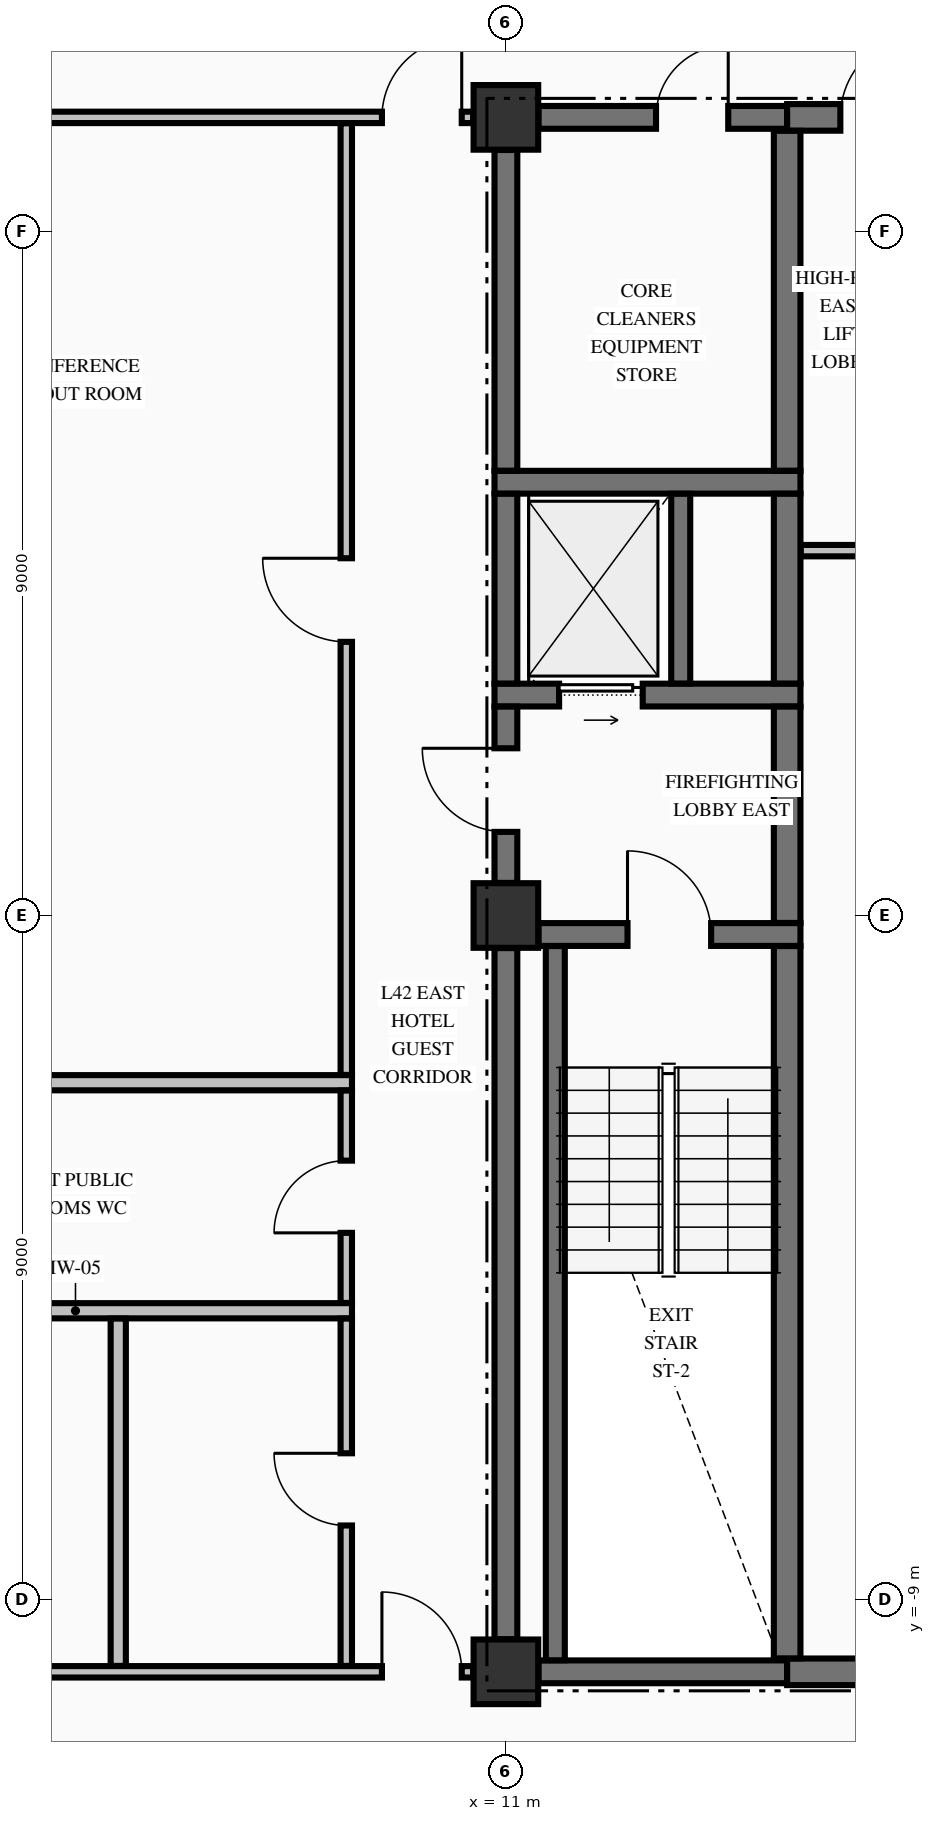
"""IFC4 building model, lengths in metres.
Left out: names, types, materials, properties, quantities, classifications, styles, units other than length and angle.
Written with IfcOpenShell. Run it as: python <this file> out.ifc"""

import sys

from ifc_helpers import new_model, si_unit, direction, frame, frame_2d, origin, origin_2d, place, context, subcontext, project, spatial, rectangle, extrude, element, fill, save


model = new_model("IFC4")
c1 = context("Model", 3, precision=1e-05, world=origin(), true_north=direction((0.0, 1.0)))
c2 = subcontext(c1, "Body", "Model", "MODEL_VIEW")
j1 = project(units=[si_unit("LENGTHUNIT", "METRE"), si_unit("PLANEANGLEUNIT", "RADIAN")], contexts=[c1])
p1 = place(None, origin())
s1 = spatial("IfcSite", under=j1, at=p1, CompositionType="ELEMENT")
p2 = place(p1, origin())
s2 = spatial("IfcBuilding", under=s1, at=p2, CompositionType="ELEMENT")
p3 = place(p2, frame((0.0, 0.0, 166.06)))
s3 = spatial("IfcBuildingStorey", under=s2, at=p3, CompositionType="ELEMENT", Elevation=166.06)
for number, where, z_axis, x_axis in (
    (1, (11.0, -9.95, -0.25), (0.0, 0.0, 1.0), (1.0, 0.0, 0.0)),
    (2, (11.0, 0.0, -0.25), (0.0, 0.0, 1.0), (1.0, 0.0, 0.0)),
    (3, (11.0, 10.5, -0.25), (0.0, 0.0, 1.0), (1.0, 0.0, 0.0)),
):
    element("IfcColumn", number, at=place(p3, frame(where, z_axis=z_axis, x_axis=x_axis)), inside=s3, PredefinedType="COLUMN", context=c2, shape_type="SweptSolid", body=[
        extrude(rectangle(XDim=0.85, YDim=0.85, at=origin_2d()), origin(), (0.0, 0.0, 1.0), 3.4),
    ])
p4 = place(p3, frame((11.429, -9.95, 0.0), z_axis=(0.0, 0.0, 1.0), x_axis=(1.0, 0.0, 0.0)))
e4 = element("IfcWall", 4, at=p4, inside=s3, PredefinedType="SHEAR", context=c2, shape_type="SweptSolid", body=[
    extrude(rectangle(XDim=3.271, YDim=0.3, at=frame_2d((1.635, 0.0))), origin(), (0.0, 0.0, 1.0), 3.15),
])
p5 = place(p3, frame((14.7, -9.95, 0.0), z_axis=(0.0, 0.0, 1.0), x_axis=(1.0, 0.0, 0.0)))
e5 = element("IfcWall", 5, at=p5, inside=s3, PredefinedType="SHEAR", context=c2, shape_type="SweptSolid", body=[
    extrude(rectangle(XDim=4.871, YDim=0.35, at=frame_2d((2.436, 0.0))), origin(), (0.0, 0.0, 1.0), 3.15),
])
p6 = place(p5, frame((2.125, 0.0, 0.0)))
e6 = element("IfcOpeningElement", 6, at=p6, cuts=e5, PredefinedType="OPENING", context=c2, shape_type="SweptSolid", body=[
    extrude(rectangle(XDim=1.05, YDim=2.15, at=frame_2d((0.525, 1.075))), frame((0.0, 0.185, 0.0), z_axis=(0.0, -1.0, 0.0), x_axis=(1.0, 0.0, 0.0)), (0.0, 0.0, 1.0), 0.37),
])
p7 = place(p3, frame((11.429, -0.25, 0.0), z_axis=(0.0, 0.0, 1.0), x_axis=(1.0, 0.0, 0.0)))
e7 = element("IfcWall", 7, at=p7, inside=s3, PredefinedType="SHEAR", context=c2, shape_type="SweptSolid", body=[
    extrude(rectangle(XDim=3.446, YDim=0.3, at=frame_2d((1.723, 0.0))), origin(), (0.0, 0.0, 1.0), 3.15),
])
p8 = place(p7, frame((1.171, 0.0, 0.0)))
e8 = element("IfcOpeningElement", 8, at=p8, cuts=e7, PredefinedType="OPENING", context=c2, shape_type="SweptSolid", body=[
    extrude(rectangle(XDim=1.1, YDim=2.15, at=frame_2d((0.55, 1.075))), frame((0.0, 0.16, 0.0), z_axis=(0.0, -1.0, 0.0), x_axis=(1.0, 0.0, 0.0)), (0.0, 0.0, 1.0), 0.32),
])
p9 = place(p3, frame((10.85, 2.9, 0.0), z_axis=(0.0, 0.0, 1.0), x_axis=(1.0, 0.0, 0.0)))
e9 = element("IfcWall", 9, at=p9, inside=s3, PredefinedType="SHEAR", context=c2, shape_type="SweptSolid", body=[
    extrude(rectangle(XDim=4.025, YDim=0.3, at=frame_2d((2.012, 0.0))), origin(), (0.0, 0.0, 1.0), 3.15),
])
p10 = place(p9, frame((0.85, 0.0, 0.0)))
e10 = element("IfcOpeningElement", 10, at=p10, cuts=e9, PredefinedType="OPENING", context=c2, shape_type="SweptSolid", body=[
    extrude(rectangle(XDim=1.1, YDim=2.2, at=frame_2d((0.55, 1.1))), frame((0.0, 0.16, 0.0), z_axis=(0.0, -1.0, 0.0), x_axis=(1.0, 0.0, 0.0)), (0.0, 0.0, 1.0), 0.32),
])
p11 = place(p3, frame((10.85, 5.7, 0.0), z_axis=(0.0, 0.0, 1.0), x_axis=(1.0, 0.0, 0.0)))
e11 = element("IfcWall", 11, at=p11, inside=s3, PredefinedType="SHEAR", context=c2, shape_type="SweptSolid", body=[
    extrude(rectangle(XDim=4.025, YDim=0.3, at=frame_2d((2.012, 0.0))), origin(), (0.0, 0.0, 1.0), 3.15),
])
p12 = place(p3, frame((11.429, 10.5, 0.0), z_axis=(0.0, 0.0, 1.0), x_axis=(1.0, 0.0, 0.0)))
e12 = element("IfcWall", 12, at=p12, inside=s3, PredefinedType="SHEAR", context=c2, shape_type="SweptSolid", body=[
    extrude(rectangle(XDim=3.271, YDim=0.3, at=frame_2d((1.635, 0.0))), origin(), (0.0, 0.0, 1.0), 3.15),
])
p13 = place(p12, frame((1.546, 0.0, 0.0)))
e13 = element("IfcOpeningElement", 13, at=p13, cuts=e12, PredefinedType="OPENING", context=c2, shape_type="SweptSolid", body=[
    extrude(rectangle(XDim=0.95, YDim=2.15, at=frame_2d((0.475, 1.075))), frame((0.0, 0.16, 0.0), z_axis=(0.0, -1.0, 0.0), x_axis=(1.0, 0.0, 0.0)), (0.0, 0.0, 1.0), 0.32),
])
p14 = place(p3, frame((14.7, 10.5, 0.0), z_axis=(0.0, 0.0, 1.0), x_axis=(1.0, 0.0, 0.0)))
e14 = element("IfcWall", 14, at=p14, inside=s3, PredefinedType="SHEAR", context=c2, shape_type="SweptSolid", body=[
    extrude(rectangle(XDim=4.871, YDim=0.35, at=frame_2d((2.436, 0.0))), origin(), (0.0, 0.0, 1.0), 3.15),
])
p15 = place(p14, frame((0.7, 0.0, 0.0)))
e15 = element("IfcOpeningElement", 15, at=p15, cuts=e14, PredefinedType="OPENING", context=c2, shape_type="SweptSolid", body=[
    extrude(rectangle(XDim=1.1, YDim=2.15, at=frame_2d((0.55, 1.075))), frame((0.0, 0.185, 0.0), z_axis=(0.0, -1.0, 0.0), x_axis=(1.0, 0.0, 0.0)), (0.0, 0.0, 1.0), 0.37),
])
p16 = place(p3, frame((-10.569, -9.95, 0.0), z_axis=(0.0, 0.0, 1.0), x_axis=(1.0, 0.0, 0.0)))
e16 = element("IfcWall", 16, at=p16, inside=s3, PredefinedType="PARTITIONING", context=c2, shape_type="SweptSolid", body=[
    extrude(rectangle(XDim=21.138, YDim=0.15, at=frame_2d((10.569, 0.0))), origin(), (0.0, 0.0, 1.0), 3.15),
])
p17 = place(p16, frame((0.15, 0.0, 0.0)))
e17 = element("IfcOpeningElement", 17, at=p17, cuts=e16, PredefinedType="OPENING", context=c2, shape_type="SweptSolid", body=[
    extrude(rectangle(XDim=1.05, YDim=2.15, at=frame_2d((0.525, 1.075))), frame((0.0, 0.085, 0.0), z_axis=(0.0, -1.0, 0.0), x_axis=(1.0, 0.0, 0.0)), (0.0, 0.0, 1.0), 0.17),
])
p18 = place(p16, frame((19.938, 0.0, 0.0)))
e18 = element("IfcOpeningElement", 18, at=p18, cuts=e16, PredefinedType="OPENING", context=c2, shape_type="SweptSolid", body=[
    extrude(rectangle(XDim=1.05, YDim=2.15, at=frame_2d((0.525, 1.075))), frame((0.0, 0.085, 0.0), z_axis=(0.0, -1.0, 0.0), x_axis=(1.0, 0.0, 0.0)), (0.0, 0.0, 1.0), 0.17),
])
p19 = place(p16, frame((13.944, 0.0, 0.0)))
e19 = element("IfcOpeningElement", 19, at=p19, cuts=e16, PredefinedType="OPENING", context=c2, shape_type="SweptSolid", body=[
    extrude(rectangle(XDim=0.95, YDim=2.15, at=frame_2d((0.475, 1.075))), frame((0.0, 0.085, 0.0), z_axis=(0.0, -1.0, 0.0), x_axis=(1.0, 0.0, 0.0)), (0.0, 0.0, 1.0), 0.17),
])
for number, where, z_axis, x_axis in (
    (20, (1.7, -5.2, 0.0), (0.0, 0.0, 1.0), (1.0, 0.0, 0.0)),
    (21, (1.7, -2.2, 0.0), (0.0, 0.0, 1.0), (1.0, 0.0, 0.0)),
):
    element("IfcWall", number, at=place(p3, frame(where, z_axis=z_axis, x_axis=x_axis)), inside=s3, PredefinedType="PARTITIONING", context=c2, shape_type="SweptSolid", body=[
        extrude(rectangle(XDim=7.275, YDim=0.2, at=frame_2d((3.638, 0.0))), origin(), (0.0, 0.0, 1.0), 3.15),
    ])
p20 = place(p3, frame((14.878, 4.8, 0.0), z_axis=(0.0, 0.0, 1.0), x_axis=(1.0, 0.0, 0.0)))
e22 = element("IfcWall", 22, at=p20, inside=s3, PredefinedType="PARTITIONING", context=c2, shape_type="SweptSolid", body=[
    extrude(rectangle(XDim=4.944, YDim=0.15, at=frame_2d((2.472, 0.0))), origin(), (0.0, 0.0, 1.0), 3.15),
])
p21 = place(p3, frame((-10.569, 10.5, 0.0), z_axis=(0.0, 0.0, 1.0), x_axis=(1.0, 0.0, 0.0)))
e23 = element("IfcWall", 23, at=p21, inside=s3, PredefinedType="PARTITIONING", context=c2, shape_type="SweptSolid", body=[
    extrude(rectangle(XDim=21.138, YDim=0.15, at=frame_2d((10.569, 0.0))), origin(), (0.0, 0.0, 1.0), 3.15),
])
p22 = place(p21, frame((0.15, 0.0, 0.0)))
e24 = element("IfcOpeningElement", 24, at=p22, cuts=e23, PredefinedType="OPENING", context=c2, shape_type="SweptSolid", body=[
    extrude(rectangle(XDim=1.05, YDim=2.15, at=frame_2d((0.525, 1.075))), frame((0.0, 0.085, 0.0), z_axis=(0.0, -1.0, 0.0), x_axis=(1.0, 0.0, 0.0)), (0.0, 0.0, 1.0), 0.17),
])
p23 = place(p21, frame((19.938, 0.0, 0.0)))
e25 = element("IfcOpeningElement", 25, at=p23, cuts=e23, PredefinedType="OPENING", context=c2, shape_type="SweptSolid", body=[
    extrude(rectangle(XDim=1.05, YDim=2.15, at=frame_2d((0.525, 1.075))), frame((0.0, 0.085, 0.0), z_axis=(0.0, -1.0, 0.0), x_axis=(1.0, 0.0, 0.0)), (0.0, 0.0, 1.0), 0.17),
])
p24 = place(p3, frame((11.0, -9.521, 0.0), z_axis=(0.0, 0.0, 1.0), x_axis=(0.0, 1.0, 0.0)))
e26 = element("IfcWall", 26, at=p24, inside=s3, PredefinedType="SHEAR", context=c2, shape_type="SweptSolid", body=[
    extrude(rectangle(XDim=9.092, YDim=0.3, at=frame_2d((4.546, 0.0))), origin(), (0.0, 0.0, 1.0), 3.15),
])
p25 = place(p3, frame((11.0, 0.429, 0.0), z_axis=(0.0, 0.0, 1.0), x_axis=(0.0, 1.0, 0.0)))
e27 = element("IfcWall", 27, at=p25, inside=s3, PredefinedType="SHEAR", context=c2, shape_type="SweptSolid", body=[
    extrude(rectangle(XDim=2.319, YDim=0.3, at=frame_2d((1.16, 0.0))), origin(), (0.0, 0.0, 1.0), 3.15),
])
p26 = place(p25, frame((0.671, 0.0, 0.0)))
e28 = element("IfcOpeningElement", 28, at=p26, cuts=e27, PredefinedType="OPENING", context=c2, shape_type="SweptSolid", body=[
    extrude(rectangle(XDim=1.1, YDim=2.15, at=frame_2d((0.55, 1.075))), frame((0.0, 0.16, 0.0), z_axis=(0.0, -1.0, 0.0), x_axis=(1.0, 0.0, 0.0)), (0.0, 0.0, 1.0), 0.32),
])
p27 = place(p3, frame((11.0, 3.052, 0.0), z_axis=(0.0, 0.0, 1.0), x_axis=(0.0, 1.0, 0.0)))
e29 = element("IfcWall", 29, at=p27, inside=s3, PredefinedType="SHEAR", context=c2, shape_type="SweptSolid", body=[
    extrude(rectangle(XDim=2.496, YDim=0.3, at=frame_2d((1.248, 0.0))), origin(), (0.0, 0.0, 1.0), 3.15),
])
p28 = place(p3, frame((11.0, 5.852, 0.0), z_axis=(0.0, 0.0, 1.0), x_axis=(0.0, 1.0, 0.0)))
e30 = element("IfcWall", 30, at=p28, inside=s3, PredefinedType="SHEAR", context=c2, shape_type="SweptSolid", body=[
    extrude(rectangle(XDim=4.219, YDim=0.3, at=frame_2d((2.109, 0.0))), origin(), (0.0, 0.0, 1.0), 3.15),
])
p29 = place(p3, frame((11.65, -9.798, 0.0), z_axis=(0.0, 0.0, 1.0), x_axis=(0.0, 1.0, 0.0)))
e31 = element("IfcWall", 31, at=p29, inside=s3, PredefinedType="SOLIDWALL", context=c2, shape_type="SweptSolid", body=[
    extrude(rectangle(XDim=9.396, YDim=0.25, at=frame_2d((4.698, 0.0))), origin(), (0.0, 0.0, 1.0), 3.15),
])
p30 = place(p3, frame((13.3, 3.052, 0.0), z_axis=(0.0, 0.0, 1.0), x_axis=(0.0, 1.0, 0.0)))
e32 = element("IfcWall", 32, at=p30, inside=s3, PredefinedType="SOLIDWALL", context=c2, shape_type="SweptSolid", body=[
    extrude(rectangle(XDim=2.496, YDim=0.25, at=frame_2d((1.248, 0.0))), origin(), (0.0, 0.0, 1.0), 3.15),
])
p31 = place(p3, frame((14.7, -9.773, 0.0), z_axis=(0.0, 0.0, 1.0), x_axis=(0.0, 1.0, 0.0)))
e33 = element("IfcWall", 33, at=p31, inside=s3, PredefinedType="SHEAR", context=c2, shape_type="SweptSolid", body=[
    extrude(rectangle(XDim=9.371, YDim=0.35, at=frame_2d((4.686, 0.0))), origin(), (0.0, 0.0, 1.0), 3.15),
])
p32 = place(p3, frame((14.7, -0.098, 0.0), z_axis=(0.0, 0.0, 1.0), x_axis=(0.0, 1.0, 0.0)))
e34 = element("IfcWall", 34, at=p32, inside=s3, PredefinedType="SHEAR", context=c2, shape_type="SweptSolid", body=[
    extrude(rectangle(XDim=2.846, YDim=0.35, at=frame_2d((1.423, 0.0))), origin(), (0.0, 0.0, 1.0), 3.15),
])
p33 = place(p3, frame((14.7, 3.052, 0.0), z_axis=(0.0, 0.0, 1.0), x_axis=(0.0, 1.0, 0.0)))
e35 = element("IfcWall", 35, at=p33, inside=s3, PredefinedType="SHEAR", context=c2, shape_type="SweptSolid", body=[
    extrude(rectangle(XDim=2.496, YDim=0.35, at=frame_2d((1.248, 0.0))), origin(), (0.0, 0.0, 1.0), 3.15),
])
p34 = place(p3, frame((14.7, 5.852, 0.0), z_axis=(0.0, 0.0, 1.0), x_axis=(0.0, 1.0, 0.0)))
e36 = element("IfcWall", 36, at=p34, inside=s3, PredefinedType="SHEAR", context=c2, shape_type="SweptSolid", body=[
    extrude(rectangle(XDim=4.471, YDim=0.35, at=frame_2d((2.235, 0.0))), origin(), (0.0, 0.0, 1.0), 3.15),
])
p35 = place(p3, frame((5.9, -9.872, 0.0), z_axis=(0.0, 0.0, 1.0), x_axis=(0.0, 1.0, 0.0)))
e37 = element("IfcWall", 37, at=p35, inside=s3, PredefinedType="PARTITIONING", context=c2, shape_type="SweptSolid", body=[
    extrude(rectangle(XDim=4.569, YDim=0.2, at=frame_2d((2.285, 0.0))), origin(), (0.0, 0.0, 1.0), 3.15),
])
p36 = place(p3, frame((8.9, -9.872, 0.0), z_axis=(0.0, 0.0, 1.0), x_axis=(0.0, 1.0, 0.0)))
e38 = element("IfcWall", 38, at=p36, inside=s3, PredefinedType="PARTITIONING", context=c2, shape_type="SweptSolid", body=[
    extrude(rectangle(XDim=4.569, YDim=0.15, at=frame_2d((2.285, 0.0))), origin(), (0.0, 0.0, 1.0), 3.15),
])
p37 = place(p36, frame((1.847, 0.0, 0.0)))
e39 = element("IfcOpeningElement", 39, at=p37, cuts=e38, PredefinedType="OPENING", context=c2, shape_type="SweptSolid", body=[
    extrude(rectangle(XDim=0.95, YDim=2.15, at=frame_2d((0.475, 1.075))), frame((0.0, 0.085, 0.0), z_axis=(0.0, -1.0, 0.0), x_axis=(1.0, 0.0, 0.0)), (0.0, 0.0, 1.0), 0.17),
])
p38 = place(p3, frame((8.9, -5.097, 0.0), z_axis=(0.0, 0.0, 1.0), x_axis=(0.0, 1.0, 0.0)))
e40 = element("IfcWall", 40, at=p38, inside=s3, PredefinedType="PARTITIONING", context=c2, shape_type="SweptSolid", body=[
    extrude(rectangle(XDim=2.794, YDim=0.15, at=frame_2d((1.397, 0.0))), origin(), (0.0, 0.0, 1.0), 3.15),
])
p39 = place(p38, frame((0.922, 0.0, 0.0)))
e41 = element("IfcOpeningElement", 41, at=p39, cuts=e40, PredefinedType="OPENING", context=c2, shape_type="SweptSolid", body=[
    extrude(rectangle(XDim=0.95, YDim=2.15, at=frame_2d((0.475, 1.075))), frame((0.0, 0.085, 0.0), z_axis=(0.0, -1.0, 0.0), x_axis=(1.0, 0.0, 0.0)), (0.0, 0.0, 1.0), 0.17),
])
p40 = place(p3, frame((8.9, -2.097, 0.0), z_axis=(0.0, 0.0, 1.0), x_axis=(0.0, 1.0, 0.0)))
e42 = element("IfcWall", 42, at=p40, inside=s3, PredefinedType="PARTITIONING", context=c2, shape_type="SweptSolid", body=[
    extrude(rectangle(XDim=12.519, YDim=0.15, at=frame_2d((6.26, 0.0))), origin(), (0.0, 0.0, 1.0), 3.15),
])
p41 = place(p40, frame((5.697, 0.0, 0.0)))
e43 = element("IfcOpeningElement", 43, at=p41, cuts=e42, PredefinedType="OPENING", context=c2, shape_type="SweptSolid", body=[
    extrude(rectangle(XDim=1.1, YDim=2.15, at=frame_2d((0.55, 1.075))), frame((0.0, 0.085, 0.0), z_axis=(0.0, -1.0, 0.0), x_axis=(1.0, 0.0, 0.0)), (0.0, 0.0, 1.0), 0.17),
])
p42 = place(p8, origin())
e44 = element("IfcDoor", 44, at=p42, inside=s3, OperationType="SINGLE_SWING_LEFT", PredefinedType="DOOR", context=c2, shape_type="SweptSolid", body=[
    extrude(rectangle(XDim=1.1, YDim=2.15, at=frame_2d((0.55, 1.075))), frame((0.0, 0.025, 0.0), z_axis=(0.0, -1.0, 0.0), x_axis=(1.0, 0.0, 0.0)), (0.0, 0.0, 1.0), 0.05),
])
fill(e8, e44)
p43 = place(p26, origin())
e45 = element("IfcDoor", 45, at=p43, inside=s3, OperationType="SINGLE_SWING_RIGHT", PredefinedType="DOOR", context=c2, shape_type="SweptSolid", body=[
    extrude(rectangle(XDim=1.1, YDim=2.15, at=frame_2d((0.55, 1.075))), frame((0.0, 0.025, 0.0), z_axis=(0.0, -1.0, 0.0), x_axis=(1.0, 0.0, 0.0)), (0.0, 0.0, 1.0), 0.05),
])
fill(e28, e45)
p44 = place(p10, origin())
e46 = element("IfcDoor", 46, at=p44, inside=s3, OperationType="SLIDING_TO_RIGHT", PredefinedType="DOOR", context=c2, shape_type="SweptSolid", body=[
    extrude(rectangle(XDim=1.1, YDim=2.2, at=frame_2d((0.55, 1.1))), frame((0.0, 0.025, 0.0), z_axis=(0.0, -1.0, 0.0), x_axis=(1.0, 0.0, 0.0)), (0.0, 0.0, 1.0), 0.05),
])
fill(e10, e46)
p45 = place(p13, origin())
e47 = element("IfcDoor", 47, at=p45, inside=s3, OperationType="SINGLE_SWING_RIGHT", PredefinedType="DOOR", context=c2, shape_type="SweptSolid", body=[
    extrude(rectangle(XDim=0.95, YDim=2.15, at=frame_2d((0.475, 1.075))), frame((0.0, 0.025, 0.0), z_axis=(0.0, -1.0, 0.0), x_axis=(1.0, 0.0, 0.0)), (0.0, 0.0, 1.0), 0.05),
])
fill(e13, e47)
p46 = place(p15, origin())
e48 = element("IfcDoor", 48, at=p46, inside=s3, OperationType="SINGLE_SWING_RIGHT", PredefinedType="DOOR", context=c2, shape_type="SweptSolid", body=[
    extrude(rectangle(XDim=1.1, YDim=2.15, at=frame_2d((0.55, 1.075))), frame((0.0, 0.025, 0.0), z_axis=(0.0, -1.0, 0.0), x_axis=(1.0, 0.0, 0.0)), (0.0, 0.0, 1.0), 0.05),
])
fill(e15, e48)
p47 = place(p23, origin())
e49 = element("IfcDoor", 49, at=p47, inside=s3, OperationType="SINGLE_SWING_RIGHT", PredefinedType="DOOR", context=c2, shape_type="SweptSolid", body=[
    extrude(rectangle(XDim=1.05, YDim=2.15, at=frame_2d((0.525, 1.075))), frame((0.0, 0.025, 0.0), z_axis=(0.0, -1.0, 0.0), x_axis=(1.0, 0.0, 0.0)), (0.0, 0.0, 1.0), 0.05),
])
fill(e25, e49)
p48 = place(p18, origin())
e50 = element("IfcDoor", 50, at=p48, inside=s3, OperationType="SINGLE_SWING_LEFT", PredefinedType="DOOR", context=c2, shape_type="SweptSolid", body=[
    extrude(rectangle(XDim=1.05, YDim=2.15, at=frame_2d((0.525, 1.075))), frame((0.0, 0.025, 0.0), z_axis=(0.0, -1.0, 0.0), x_axis=(1.0, 0.0, 0.0)), (0.0, 0.0, 1.0), 0.05),
])
fill(e18, e50)
p49 = place(p41, origin())
e51 = element("IfcDoor", 51, at=p49, inside=s3, OperationType="SINGLE_SWING_RIGHT", PredefinedType="DOOR", context=c2, shape_type="SweptSolid", body=[
    extrude(rectangle(XDim=1.1, YDim=2.15, at=frame_2d((0.55, 1.075))), frame((0.0, 0.025, 0.0), z_axis=(0.0, -1.0, 0.0), x_axis=(1.0, 0.0, 0.0)), (0.0, 0.0, 1.0), 0.05),
])
fill(e43, e51)
p50 = place(p39, origin())
e52 = element("IfcDoor", 52, at=p50, inside=s3, OperationType="SINGLE_SWING_LEFT", PredefinedType="DOOR", context=c2, shape_type="SweptSolid", body=[
    extrude(rectangle(XDim=0.95, YDim=2.15, at=frame_2d((0.475, 1.075))), frame((0.0, 0.025, 0.0), z_axis=(0.0, -1.0, 0.0), x_axis=(1.0, 0.0, 0.0)), (0.0, 0.0, 1.0), 0.05),
])
fill(e41, e52)
p51 = place(p37, origin())
e53 = element("IfcDoor", 53, at=p51, inside=s3, OperationType="SINGLE_SWING_RIGHT", PredefinedType="DOOR", context=c2, shape_type="SweptSolid", body=[
    extrude(rectangle(XDim=0.95, YDim=2.15, at=frame_2d((0.475, 1.075))), frame((0.0, 0.025, 0.0), z_axis=(0.0, -1.0, 0.0), x_axis=(1.0, 0.0, 0.0)), (0.0, 0.0, 1.0), 0.05),
])
fill(e39, e53)
save(model, sys.argv[1])
